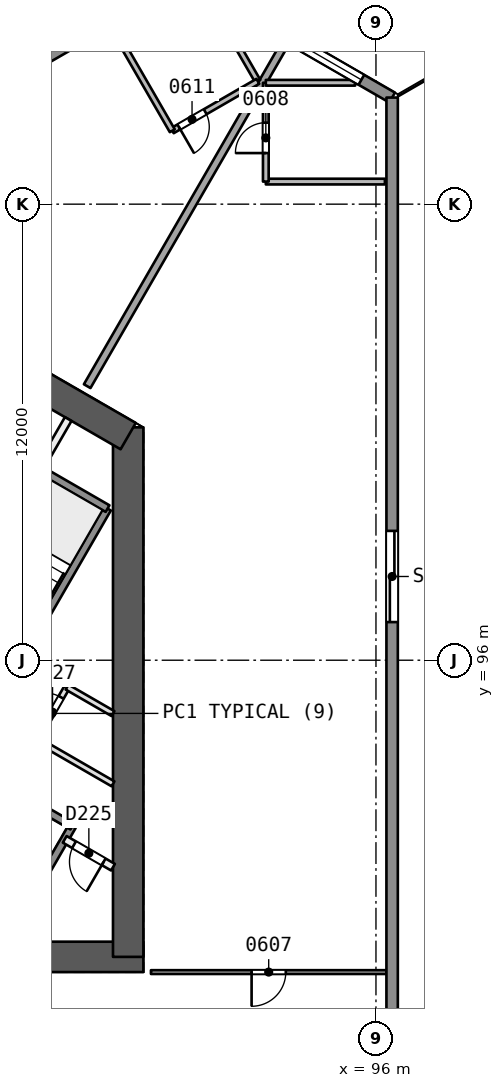
"""IFC4 building model, lengths in metres.
Left out: names, types, materials, properties, quantities, classifications, styles, units other than length and angle.
Written with IfcOpenShell. Run it as: python <this file> out.ifc"""

import sys

from ifc_helpers import new_model, si_unit, direction, frame, frame_2d, origin, place, context, subcontext, project, spatial, rectangle, extrude, element, fill, save


model = new_model("IFC4")
c1 = context("Model", 3, precision=1e-05, world=origin(), true_north=direction((0.0, 1.0)))
c2 = subcontext(c1, "Body", "Model", "MODEL_VIEW")
j1 = project(units=[si_unit("LENGTHUNIT", "METRE"), si_unit("PLANEANGLEUNIT", "RADIAN")], contexts=[c1])
p1 = place(None, origin())
s1 = spatial("IfcSite", under=j1, at=p1, CompositionType="ELEMENT")
p2 = place(p1, origin())
s2 = spatial("IfcBuilding", under=s1, at=p2, CompositionType="ELEMENT")
p3 = place(p2, frame((0.0, 0.0, 33.7)))
s3 = spatial("IfcBuildingStorey", under=s2, at=p3, CompositionType="ELEMENT", Elevation=33.7)
p4 = place(p3, frame((79.731, 88.194, 0.0), z_axis=(0.0, 0.0, 1.0), x_axis=(1.0, 0.0, 0.0)))
e1 = element("IfcWall", 1, at=p4, inside=s3, PredefinedType="SHEAR", context=c2, shape_type="SweptSolid", body=[
    extrude(rectangle(XDim=10.149, YDim=0.8, at=frame_2d((5.074, 0.0))), origin(), (0.0, 0.0, 1.0), 3.7),
])
p5 = place(p4, frame((0.719, 0.0, 0.0)))
e2 = element("IfcOpeningElement", 2, at=p5, cuts=e1, PredefinedType="OPENING", context=c2, shape_type="SweptSolid", body=[
    extrude(rectangle(XDim=1.2, YDim=2.1, at=frame_2d((0.6, 1.05))), frame((0.0, 0.411, 0.0), z_axis=(0.0, -1.0, 0.0), x_axis=(1.0, 0.0, 0.0)), (0.0, 0.0, 1.0), 0.821),
])
p6 = place(p3, frame((89.48, 88.194, 0.0), z_axis=(0.0, 0.0, 1.0), x_axis=(0.0, 1.0, 0.0)))
e3 = element("IfcWall", 3, at=p6, inside=s3, PredefinedType="SHEAR", context=c2, shape_type="SweptSolid", body=[
    extrude(rectangle(XDim=13.933, YDim=0.8, at=frame_2d((6.967, 0.0))), origin(), (0.0, 0.0, 1.0), 3.7),
])
p7 = place(p3, frame((89.48, 101.897, 0.0), z_axis=(0.0, 0.0, 1.0), x_axis=(-0.866034355626, 0.499984494636, 0.0)))
e4 = element("IfcWall", 4, at=p7, inside=s3, PredefinedType="SHEAR", context=c2, shape_type="SweptSolid", body=[
    extrude(rectangle(XDim=3.414, YDim=0.8, at=frame_2d((1.707, 0.0))), origin(), (0.0, 0.0, 1.0), 3.7),
])
p8 = place(p3, frame((96.276, 87.794, 0.0), z_axis=(0.0, 0.0, 1.0), x_axis=(-1.0, 0.0, 0.0)))
e5 = element("IfcWall", 5, at=p8, inside=s3, PredefinedType="PARTITIONING", context=c2, shape_type="SweptSolid", body=[
    extrude(rectangle(XDim=6.197, YDim=0.1, at=frame_2d((3.099, 0.0))), origin(), (0.0, 0.0, 1.0), 3.2),
])
p9 = place(p8, frame((2.649, 0.0, 0.0)))
e6 = element("IfcOpeningElement", 6, at=p9, cuts=e5, PredefinedType="OPENING", context=c2, shape_type="SweptSolid", body=[
    extrude(rectangle(XDim=0.9, YDim=2.1, at=frame_2d((0.45, 1.05))), frame((0.0, 0.061, 0.0), z_axis=(0.0, -1.0, 0.0), x_axis=(1.0, 0.0, 0.0)), (0.0, 0.0, 1.0), 0.121),
])
p10 = place(p3, frame((96.235, 108.594, 0.0), z_axis=(0.0, 0.0, 1.0), x_axis=(-1.0, 0.0, 0.0)))
e7 = element("IfcWall", 7, at=p10, inside=s3, PredefinedType="PARTITIONING", context=c2, shape_type="SweptSolid", body=[
    extrude(rectangle(XDim=3.134, YDim=0.15, at=frame_2d((1.567, 0.0))), origin(), (0.0, 0.0, 1.0), 3.2),
])
p11 = place(p3, frame((93.102, 108.594, 0.0), z_axis=(0.0, 0.0, 1.0), x_axis=(0.0, 1.0, 0.0)))
e8 = element("IfcWall", 8, at=p11, inside=s3, PredefinedType="PARTITIONING", context=c2, shape_type="SweptSolid", body=[
    extrude(rectangle(XDim=2.6, YDim=0.15, at=frame_2d((1.3, 0.0))), origin(), (0.0, 0.0, 1.0), 3.2),
])
p12 = place(p11, frame((0.75, 0.0, 0.0)))
e9 = element("IfcOpeningElement", 9, at=p12, cuts=e8, PredefinedType="OPENING", context=c2, shape_type="SweptSolid", body=[
    extrude(rectangle(XDim=0.8, YDim=2.1, at=frame_2d((0.4, 1.05))), frame((0.0, 0.085, 0.0), z_axis=(0.0, -1.0, 0.0), x_axis=(1.0, 0.0, 0.0)), (0.0, 0.0, 1.0), 0.171),
])
p13 = place(p3, frame((93.102, 111.194, 0.0), z_axis=(0.0, 0.0, 1.0), x_axis=(1.0, 0.0, 0.0)))
e10 = element("IfcWall", 10, at=p13, inside=s3, PredefinedType="PARTITIONING", context=c2, shape_type="SweptSolid", body=[
    extrude(rectangle(XDim=2.352, YDim=0.15, at=frame_2d((1.176, 0.0))), origin(), (0.0, 0.0, 1.0), 3.2),
])
p14 = place(p3, frame((93.621, 112.252, 0.0), z_axis=(0.0, 0.0, 1.0), x_axis=(-0.499992367345, -0.866029810455, 0.0)))
e11 = element("IfcWall", 11, at=p14, inside=s3, PredefinedType="PARTITIONING", context=c2, shape_type="SweptSolid", body=[
    extrude(rectangle(XDim=10.44, YDim=0.2, at=frame_2d((5.22, 0.0))), origin(), (0.0, 0.0, 1.0), 3.2),
])
p15 = place(p3, frame((91.644, 113.393, 0.0), z_axis=(0.0, 0.0, 1.0), x_axis=(0.500021675881, -0.866012888847, 0.0)))
e12 = element("IfcWall", 12, at=p15, inside=s3, PredefinedType="PARTITIONING", context=c2, shape_type="SweptSolid", body=[
    extrude(rectangle(XDim=2.496, YDim=0.15, at=frame_2d((1.248, 0.0))), origin(), (0.0, 0.0, 1.0), 3.2),
])
p16 = place(p3, frame((92.892, 111.232, 0.0), z_axis=(0.0, 0.0, 1.0), x_axis=(-0.866021400173, -0.500006934395, 0.0)))
e13 = element("IfcWall", 13, at=p16, inside=s3, PredefinedType="PARTITIONING", context=c2, shape_type="SweptSolid", body=[
    extrude(rectangle(XDim=2.6, YDim=0.15, at=frame_2d((1.3, 0.0))), origin(), (0.0, 0.0, 1.0), 3.2),
])
p17 = place(p16, frame((1.6, 0.0, 0.0)))
e14 = element("IfcOpeningElement", 14, at=p17, cuts=e13, PredefinedType="OPENING", context=c2, shape_type="SweptSolid", body=[
    extrude(rectangle(XDim=0.8, YDim=2.1, at=frame_2d((0.4, 1.05))), frame((0.0, 0.085, 0.0), z_axis=(0.0, -1.0, 0.0), x_axis=(1.0, 0.0, 0.0)), (0.0, 0.0, 1.0), 0.171),
])
p18 = place(p3, frame((90.64, 109.932, 0.0), z_axis=(0.0, 0.0, 1.0), x_axis=(-0.499951757484, 0.866053254822, 0.0)))
e15 = element("IfcWall", 15, at=p18, inside=s3, PredefinedType="PARTITIONING", context=c2, shape_type="SweptSolid", body=[
    extrude(rectangle(XDim=3.134, YDim=0.15, at=frame_2d((1.567, 0.0))), origin(), (0.0, 0.0, 1.0), 3.2),
])
p19 = place(p3, frame((90.965, 113.957, 0.0), z_axis=(0.0, 0.0, 1.0), x_axis=(0.866032760736, -0.49998725717, 0.0)))
e16 = element("IfcWall", 16, at=p19, inside=s3, PredefinedType="SOLIDWALL", context=c2, shape_type="SweptSolid", body=[
    extrude(rectangle(XDim=6.305, YDim=0.3, at=frame_2d((3.152, 0.0))), origin(), (0.0, 0.0, 1.0), 3.2),
])
p20 = place(p19, frame((3.57, 0.0, 0.9)))
e17 = element("IfcOpeningElement", 17, at=p20, cuts=e16, PredefinedType="OPENING", context=c2, shape_type="SweptSolid", body=[
    extrude(rectangle(XDim=1.8, YDim=1.5, at=frame_2d((0.9, 0.75))), frame((0.0, 0.161, 0.0), z_axis=(0.0, -1.0, 0.0), x_axis=(1.0, 0.0, 0.0)), (0.0, 0.0, 1.0), 0.321),
])
p21 = place(p19, frame((0.852, 0.0, 0.9)))
e18 = element("IfcOpeningElement", 18, at=p21, cuts=e16, PredefinedType="OPENING", context=c2, shape_type="SweptSolid", body=[
    extrude(rectangle(XDim=1.8, YDim=1.5, at=frame_2d((0.9, 0.75))), frame((0.0, 0.161, 0.0), z_axis=(0.0, -1.0, 0.0), x_axis=(1.0, 0.0, 0.0)), (0.0, 0.0, 1.0), 0.321),
])
p22 = place(p3, frame((96.425, 110.805, 0.0), z_axis=(0.0, 0.0, 1.0), x_axis=(0.0, -1.0, 0.0)))
e19 = element("IfcWall", 19, at=p22, inside=s3, PredefinedType="SOLIDWALL", context=c2, shape_type="SweptSolid", body=[
    extrude(rectangle(XDim=61.61, YDim=0.3, at=frame_2d((30.805, 0.0))), origin(), (0.0, 0.0, 1.0), 3.2),
])
p23 = place(p22, frame((29.605, 0.0, 0.0)))
e20 = element("IfcOpeningElement", 20, at=p23, cuts=e19, PredefinedType="OPENING", context=c2, shape_type="SweptSolid", body=[
    extrude(rectangle(XDim=2.4, YDim=2.4, at=frame_2d((1.2, 1.2))), frame((0.0, 0.161, 0.0), z_axis=(0.0, -1.0, 0.0), x_axis=(1.0, 0.0, 0.0)), (0.0, 0.0, 1.0), 0.321),
])
p24 = place(p22, frame((34.437, 0.0, 0.0)))
e21 = element("IfcOpeningElement", 21, at=p24, cuts=e19, PredefinedType="OPENING", context=c2, shape_type="SweptSolid", body=[
    extrude(rectangle(XDim=2.4, YDim=2.4, at=frame_2d((1.2, 1.2))), frame((0.0, 0.161, 0.0), z_axis=(0.0, -1.0, 0.0), x_axis=(1.0, 0.0, 0.0)), (0.0, 0.0, 1.0), 0.321),
])
p25 = place(p22, frame((47.767, 0.0, 0.0)))
e22 = element("IfcOpeningElement", 22, at=p25, cuts=e19, PredefinedType="OPENING", context=c2, shape_type="SweptSolid", body=[
    extrude(rectangle(XDim=2.4, YDim=2.4, at=frame_2d((1.2, 1.2))), frame((0.0, 0.161, 0.0), z_axis=(0.0, -1.0, 0.0), x_axis=(1.0, 0.0, 0.0)), (0.0, 0.0, 1.0), 0.321),
])
p26 = place(p22, frame((24.772, 0.0, 0.0)))
e23 = element("IfcOpeningElement", 23, at=p26, cuts=e19, PredefinedType="OPENING", context=c2, shape_type="SweptSolid", body=[
    extrude(rectangle(XDim=2.4, YDim=2.4, at=frame_2d((1.2, 1.2))), frame((0.0, 0.161, 0.0), z_axis=(0.0, -1.0, 0.0), x_axis=(1.0, 0.0, 0.0)), (0.0, 0.0, 1.0), 0.321),
])
p27 = place(p22, frame((11.402, 0.0, 0.0)))
e24 = element("IfcOpeningElement", 24, at=p27, cuts=e19, PredefinedType="OPENING", context=c2, shape_type="SweptSolid", body=[
    extrude(rectangle(XDim=2.4, YDim=2.4, at=frame_2d((1.2, 1.2))), frame((0.0, 0.161, 0.0), z_axis=(0.0, -1.0, 0.0), x_axis=(1.0, 0.0, 0.0)), (0.0, 0.0, 1.0), 0.321),
])
p28 = place(p3, frame((37.61, 83.152, 0.0), z_axis=(0.0, 0.0, 1.0), x_axis=(0.866024438126, 0.500001672566, 0.0)))
e25 = element("IfcWall", 25, at=p28, inside=s3, PredefinedType="SOLIDWALL", context=c2, shape_type="SweptSolid", body=[
    extrude(rectangle(XDim=61.61, YDim=0.3, at=frame_2d((30.805, 0.0))), origin(), (0.0, 0.0, 1.0), 3.2),
])
p29 = place(p28, frame((34.281, 0.0, 0.0)))
e26 = element("IfcOpeningElement", 26, at=p29, cuts=e25, PredefinedType="OPENING", context=c2, shape_type="SweptSolid", body=[
    extrude(rectangle(XDim=2.4, YDim=2.4, at=frame_2d((1.2, 1.2))), frame((0.0, 0.161, 0.0), z_axis=(0.0, -1.0, 0.0), x_axis=(1.0, 0.0, 0.0)), (0.0, 0.0, 1.0), 0.321),
])
p30 = place(p28, frame((47.767, 0.0, 0.0)))
e27 = element("IfcOpeningElement", 27, at=p30, cuts=e25, PredefinedType="OPENING", context=c2, shape_type="SweptSolid", body=[
    extrude(rectangle(XDim=2.4, YDim=2.4, at=frame_2d((1.2, 1.2))), frame((0.0, 0.161, 0.0), z_axis=(0.0, -1.0, 0.0), x_axis=(1.0, 0.0, 0.0)), (0.0, 0.0, 1.0), 0.321),
])
p31 = place(p28, frame((24.305, 0.0, 0.0)))
e28 = element("IfcOpeningElement", 28, at=p31, cuts=e25, PredefinedType="OPENING", context=c2, shape_type="SweptSolid", body=[
    extrude(rectangle(XDim=2.4, YDim=2.4, at=frame_2d((1.2, 1.2))), frame((0.0, 0.161, 0.0), z_axis=(0.0, -1.0, 0.0), x_axis=(1.0, 0.0, 0.0)), (0.0, 0.0, 1.0), 0.321),
])
p32 = place(p28, frame((11.402, 0.0, 0.0)))
e29 = element("IfcOpeningElement", 29, at=p32, cuts=e25, PredefinedType="OPENING", context=c2, shape_type="SweptSolid", body=[
    extrude(rectangle(XDim=2.4, YDim=2.4, at=frame_2d((1.2, 1.2))), frame((0.0, 0.161, 0.0), z_axis=(0.0, -1.0, 0.0), x_axis=(1.0, 0.0, 0.0)), (0.0, 0.0, 1.0), 0.321),
])
p33 = place(p28, frame((28.981, 0.0, 0.0)))
e30 = element("IfcOpeningElement", 30, at=p33, cuts=e25, PredefinedType="OPENING", context=c2, shape_type="SweptSolid", body=[
    extrude(rectangle(XDim=2.4, YDim=2.4, at=frame_2d((1.2, 1.2))), frame((0.0, 0.161, 0.0), z_axis=(0.0, -1.0, 0.0), x_axis=(1.0, 0.0, 0.0)), (0.0, 0.0, 1.0), 0.321),
])
p34 = place(p3, frame((86.77, 89.486, 0.0), z_axis=(0.0, 0.0, 1.0), x_axis=(0.499961042966, 0.86604789447, 0.0)))
e31 = element("IfcWall", 31, at=p34, inside=s3, PredefinedType="SOLIDWALL", context=c2, shape_type="SweptSolid", body=[
    extrude(rectangle(XDim=2.48, YDim=0.2, at=frame_2d((1.24, 0.0))), origin(), (0.0, 0.0, 1.0), 3.2),
])
p35 = place(p3, frame((87.071, 93.908, 0.0), z_axis=(0.0, 0.0, 1.0), x_axis=(0.499995408039, 0.866028054938, 0.0)))
e32 = element("IfcWall", 32, at=p35, inside=s3, PredefinedType="PARTITIONING", context=c2, shape_type="SweptSolid", body=[
    extrude(rectangle(XDim=1.6, YDim=0.15, at=frame_2d((0.8, 0.0))), origin(), (0.0, 0.0, 1.0), 3.2),
])
p36 = place(p35, frame((0.387, 0.0, 0.0)))
e33 = element("IfcOpeningElement", 33, at=p36, cuts=e32, PredefinedType="OPENING", context=c2, shape_type="SweptSolid", body=[
    extrude(rectangle(XDim=0.9, YDim=2.1, at=frame_2d((0.45, 1.05))), frame((0.0, 0.085, 0.0), z_axis=(0.0, -1.0, 0.0), x_axis=(1.0, 0.0, 0.0)), (0.0, 0.0, 1.0), 0.171),
])
p37 = place(p3, frame((85.087, 93.321, 0.0), z_axis=(0.0, 0.0, 1.0), x_axis=(0.500019787375, 0.866013979237, 0.0)))
e34 = element("IfcWall", 34, at=p37, inside=s3, PredefinedType="SOLIDWALL", context=c2, shape_type="SweptSolid", body=[
    extrude(rectangle(XDim=7.7, YDim=0.2, at=frame_2d((3.85, 0.0))), origin(), (0.0, 0.0, 1.0), 3.2),
])
p38 = place(p3, frame((87.09, 100.94, 0.0), z_axis=(0.0, 0.0, 1.0), x_axis=(0.499956811548, 0.866050337213, 0.0)))
e35 = element("IfcWall", 35, at=p38, inside=s3, PredefinedType="PARTITIONING", context=c2, shape_type="SweptSolid", body=[
    extrude(rectangle(XDim=1.623, YDim=0.2, at=frame_2d((0.812, 0.0))), origin(), (0.0, 0.0, 1.0), 3.2),
])
p39 = place(p3, frame((89.08, 90.554, 0.0), z_axis=(0.0, 0.0, 1.0), x_axis=(-0.866022048785, 0.500005810984, 0.0)))
e36 = element("IfcWall", 36, at=p39, inside=s3, PredefinedType="PARTITIONING", context=c2, shape_type="SweptSolid", body=[
    extrude(rectangle(XDim=1.467, YDim=0.2, at=frame_2d((0.733, 0.0))), origin(), (0.0, 0.0, 1.0), 3.2),
])
p40 = place(p39, frame((0.283, 0.0, 0.0)))
e37 = element("IfcOpeningElement", 37, at=p40, cuts=e36, PredefinedType="OPENING", context=c2, shape_type="SweptSolid", body=[
    extrude(rectangle(XDim=0.9, YDim=2.1, at=frame_2d((0.45, 1.05))), frame((0.0, 0.11, 0.0), z_axis=(0.0, -1.0, 0.0), x_axis=(1.0, 0.0, 0.0)), (0.0, 0.0, 1.0), 0.221),
])
p41 = place(p3, frame((88.01, 91.634, 0.0), z_axis=(0.0, 0.0, 1.0), x_axis=(-0.866024315419, 0.5000018851, 0.0)))
e38 = element("IfcWall", 38, at=p41, inside=s3, PredefinedType="SOLIDWALL", context=c2, shape_type="SweptSolid", body=[
    extrude(rectangle(XDim=9.0, YDim=0.2, at=frame_2d((4.5, 0.0))), origin(), (0.0, 0.0, 1.0), 3.2),
])
p42 = place(p3, frame((89.08, 92.748, 0.0), z_axis=(0.0, 0.0, 1.0), x_axis=(-0.866026103983, 0.499998787219, 0.0)))
e39 = element("IfcWall", 39, at=p42, inside=s3, PredefinedType="PARTITIONING", context=c2, shape_type="SweptSolid", body=[
    extrude(rectangle(XDim=2.32, YDim=0.15, at=frame_2d((1.16, 0.0))), origin(), (0.0, 0.0, 1.0), 3.2),
])
p43 = place(p3, frame((89.08, 94.595, 0.0), z_axis=(0.0, 0.0, 1.0), x_axis=(-0.866028321769, 0.499994945868, 0.0)))
e40 = element("IfcWall", 40, at=p43, inside=s3, PredefinedType="PARTITIONING", context=c2, shape_type="SweptSolid", body=[
    extrude(rectangle(XDim=1.396, YDim=0.15, at=frame_2d((0.698, 0.0))), origin(), (0.0, 0.0, 1.0), 3.2),
])
p44 = place(p3, frame((88.937, 99.99, 0.0), z_axis=(0.0, 0.0, 1.0), x_axis=(-0.866004344652, 0.500036473714, 0.0)))
e41 = element("IfcWall", 41, at=p44, inside=s3, PredefinedType="SOLIDWALL", context=c2, shape_type="SweptSolid", body=[
    extrude(rectangle(XDim=4.15, YDim=0.2, at=frame_2d((2.075, 0.0))), origin(), (0.0, 0.0, 1.0), 3.2),
])
p45 = place(p9, origin())
e42 = element("IfcDoor", 42, at=p45, inside=s3, OperationType="SINGLE_SWING_RIGHT", PredefinedType="NOTDEFINED", context=c2, shape_type="SweptSolid", body=[
    extrude(rectangle(XDim=0.9, YDim=2.1, at=frame_2d((0.45, 1.05))), frame((0.0, 0.025, 0.0), z_axis=(0.0, -1.0, 0.0), x_axis=(1.0, 0.0, 0.0)), (0.0, 0.0, 1.0), 0.05),
])
fill(e6, e42)
p46 = place(p12, origin())
e43 = element("IfcDoor", 43, at=p46, inside=s3, OperationType="SINGLE_SWING_LEFT", PredefinedType="NOTDEFINED", context=c2, shape_type="SweptSolid", body=[
    extrude(rectangle(XDim=0.8, YDim=2.1, at=frame_2d((0.4, 1.05))), frame((0.0, 0.025, 0.0), z_axis=(0.0, -1.0, 0.0), x_axis=(1.0, 0.0, 0.0)), (0.0, 0.0, 1.0), 0.05),
])
fill(e9, e43)
p47 = place(p17, origin())
e44 = element("IfcDoor", 44, at=p47, inside=s3, OperationType="SINGLE_SWING_RIGHT", PredefinedType="NOTDEFINED", context=c2, shape_type="SweptSolid", body=[
    extrude(rectangle(XDim=0.8, YDim=2.1, at=frame_2d((0.4, 1.05))), frame((0.0, 0.025, 0.0), z_axis=(0.0, -1.0, 0.0), x_axis=(1.0, 0.0, 0.0)), (0.0, 0.0, 1.0), 0.05),
])
fill(e14, e44)
p48 = place(p20, origin())
e45 = element("IfcWindow", 45, at=p48, inside=s3, PartitioningType="SINGLE_PANEL", PredefinedType="WINDOW", context=c2, shape_type="SweptSolid", body=[
    extrude(rectangle(XDim=1.8, YDim=1.5, at=frame_2d((0.9, 0.75))), frame((0.0, 0.03, 0.0), z_axis=(0.0, -1.0, 0.0), x_axis=(1.0, 0.0, 0.0)), (0.0, 0.0, 1.0), 0.06),
])
fill(e17, e45)
p49 = place(p27, origin())
e46 = element("IfcDoor", 46, at=p49, inside=s3, OperationType="SLIDING_TO_LEFT", PredefinedType="NOTDEFINED", context=c2, shape_type="SweptSolid", body=[
    extrude(rectangle(XDim=2.4, YDim=2.4, at=frame_2d((1.2, 1.2))), frame((0.0, 0.025, 0.0), z_axis=(0.0, -1.0, 0.0), x_axis=(1.0, 0.0, 0.0)), (0.0, 0.0, 1.0), 0.05),
])
fill(e24, e46)
p50 = place(p40, origin())
e47 = element("IfcDoor", 47, at=p50, inside=s3, OperationType="SINGLE_SWING_LEFT", PredefinedType="NOTDEFINED", context=c2, shape_type="SweptSolid", body=[
    extrude(rectangle(XDim=0.9, YDim=2.1, at=frame_2d((0.45, 1.05))), frame((0.0, 0.025, 0.0), z_axis=(0.0, -1.0, 0.0), x_axis=(1.0, 0.0, 0.0)), (0.0, 0.0, 1.0), 0.05),
])
fill(e37, e47)
p51 = place(p36, origin())
e48 = element("IfcDoor", 48, at=p51, inside=s3, OperationType="SINGLE_SWING_LEFT", PredefinedType="NOTDEFINED", context=c2, shape_type="SweptSolid", body=[
    extrude(rectangle(XDim=0.9, YDim=2.1, at=frame_2d((0.45, 1.05))), frame((0.0, 0.025, 0.0), z_axis=(0.0, -1.0, 0.0), x_axis=(1.0, 0.0, 0.0)), (0.0, 0.0, 1.0), 0.05),
])
fill(e33, e48)
save(model, sys.argv[1])
